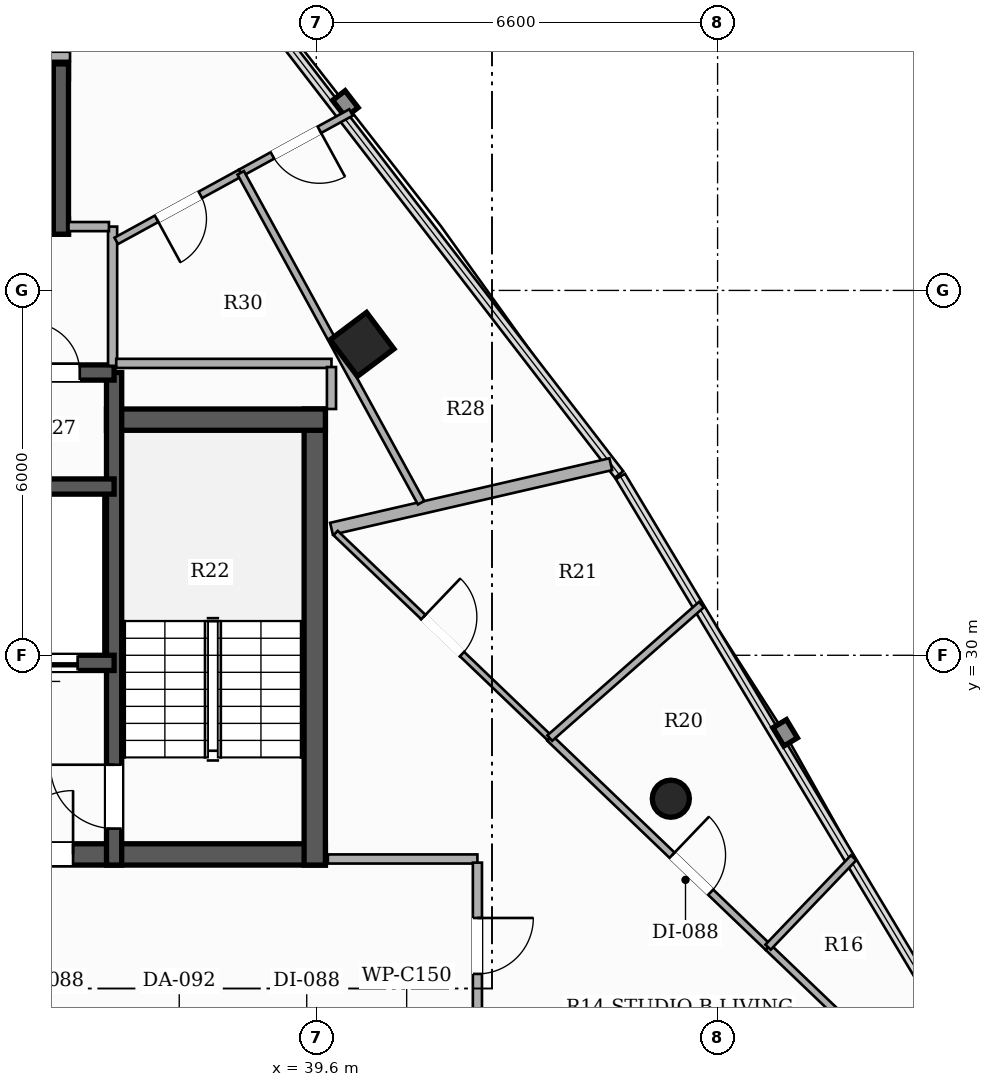
"""IFC4 building model, lengths in metres.
Left out: names, types, materials, properties, quantities, classifications, styles, units other than length and angle.
Written with IfcOpenShell. Run it as: python <this file> out.ifc"""

import sys

from ifc_helpers import new_model, si_unit, direction, frame, frame_2d, origin, origin_2d, place, context, subcontext, project, spatial, rectangle, hollow_rectangle, hollow_circle, extrude, element, fill, save


model = new_model("IFC4")
c1 = context("Model", 3, precision=1e-05, world=origin(), true_north=direction((0.0, 1.0)))
c2 = subcontext(c1, "Body", "Model", "MODEL_VIEW")
j1 = project(units=[si_unit("LENGTHUNIT", "METRE"), si_unit("PLANEANGLEUNIT", "RADIAN")], contexts=[c1])
p1 = place(None, origin())
s1 = spatial("IfcSite", under=j1, at=p1, CompositionType="ELEMENT")
p2 = place(p1, origin())
s2 = spatial("IfcBuilding", under=s1, at=p2, CompositionType="ELEMENT")
p3 = place(p2, frame((0.0, 0.0, 219.5)))
s3 = spatial("IfcBuildingStorey", under=s2, at=p3, CompositionType="ELEMENT", Elevation=219.5)
p4 = place(p3, frame((26.25, 26.725, 0.0), z_axis=(0.0, 0.0, 1.0), x_axis=(1.0, 0.0, 0.0)))
e1 = element("IfcWall", 1, at=p4, inside=s3, PredefinedType="SHEAR", context=c2, shape_type="SweptSolid", body=[
    extrude(rectangle(XDim=13.5, YDim=0.35, at=frame_2d((6.75, 0.0))), origin(), (0.0, 0.0, 1.0), 3.3),
])
p5 = place(p4, frame((4.35, 0.0, 0.0)))
e2 = element("IfcOpeningElement", 2, at=p5, cuts=e1, PredefinedType="OPENING", context=c2, shape_type="SweptSolid", body=[
    extrude(rectangle(XDim=1.05, YDim=2.15, at=frame_2d((0.525, 1.075))), frame((0.0, 0.185, 0.0), z_axis=(0.0, -1.0, 0.0), x_axis=(1.0, 0.0, 0.0)), (0.0, 0.0, 1.0), 0.37),
])
p6 = place(p4, frame((8.3, 0.0, 0.0)))
e3 = element("IfcOpeningElement", 3, at=p6, cuts=e1, PredefinedType="OPENING", context=c2, shape_type="SweptSolid", body=[
    extrude(rectangle(XDim=1.05, YDim=2.15, at=frame_2d((0.525, 1.075))), frame((0.0, 0.185, 0.0), z_axis=(0.0, -1.0, 0.0), x_axis=(1.0, 0.0, 0.0)), (0.0, 0.0, 1.0), 0.37),
])
p7 = place(p3, frame((39.575, 26.55, 0.0), z_axis=(0.0, 0.0, 1.0), x_axis=(0.0, 1.0, 0.0)))
e4 = element("IfcWall", 4, at=p7, inside=s3, PredefinedType="SHEAR", context=c2, shape_type="SweptSolid", body=[
    extrude(rectangle(XDim=7.5, YDim=0.35, at=frame_2d((3.75, 0.0))), origin(), (0.0, 0.0, 1.0), 3.3),
])
p8 = place(p3, frame((36.15, 33.875, 0.0), z_axis=(0.0, 0.0, 1.0), x_axis=(1.0, 0.0, 0.0)))
e5 = element("IfcWall", 5, at=p8, inside=s3, PredefinedType="SHEAR", context=c2, shape_type="SweptSolid", body=[
    extrude(rectangle(XDim=3.6, YDim=0.35, at=frame_2d((1.8, 0.0))), origin(), (0.0, 0.0, 1.0), 3.3),
])
p9 = place(p3, frame((36.275, 26.55, 0.0), z_axis=(0.0, 0.0, 1.0), x_axis=(0.0, 1.0, 0.0)))
e6 = element("IfcWall", 6, at=p9, inside=s3, PredefinedType="SHEAR", context=c2, shape_type="SweptSolid", body=[
    extrude(rectangle(XDim=8.1, YDim=0.25, at=frame_2d((4.05, 0.0))), origin(), (0.0, 0.0, 1.0), 3.3),
])
p10 = place(p9, frame((0.6, 0.0, 0.0)))
e7 = element("IfcOpeningElement", 7, at=p10, cuts=e6, PredefinedType="OPENING", context=c2, shape_type="SweptSolid", body=[
    extrude(rectangle(XDim=1.05, YDim=2.15, at=frame_2d((0.525, 1.075))), frame((0.0, 0.135, 0.0), z_axis=(0.0, -1.0, 0.0), x_axis=(1.0, 0.0, 0.0)), (0.0, 0.0, 1.0), 0.27),
])
p11 = place(p3, frame((36.275, 29.875, 0.0), z_axis=(0.0, 0.0, 1.0), x_axis=(-1.0, 0.0, 0.0)))
e8 = element("IfcWall", 8, at=p11, inside=s3, PredefinedType="SHEAR", context=c2, shape_type="SweptSolid", body=[
    extrude(rectangle(XDim=6.55, YDim=0.25, at=frame_2d((3.275, 0.0))), origin(), (0.0, 0.0, 1.0), 3.3),
])
p12 = place(p11, frame((4.875, 0.0, 0.0)))
e9 = element("IfcOpeningElement", 9, at=p12, cuts=e8, PredefinedType="OPENING", context=c2, shape_type="SweptSolid", body=[
    extrude(rectangle(XDim=1.1, YDim=2.2, at=frame_2d((0.55, 1.1))), frame((0.0, 0.135, 0.0), z_axis=(0.0, -1.0, 0.0), x_axis=(1.0, 0.0, 0.0)), (0.0, 0.0, 1.0), 0.27),
])
p13 = place(p11, frame((2.875, 0.0, 0.0)))
e10 = element("IfcOpeningElement", 10, at=p13, cuts=e8, PredefinedType="OPENING", context=c2, shape_type="SweptSolid", body=[
    extrude(rectangle(XDim=1.1, YDim=2.2, at=frame_2d((0.55, 1.1))), frame((0.0, 0.135, 0.0), z_axis=(0.0, -1.0, 0.0), x_axis=(1.0, 0.0, 0.0)), (0.0, 0.0, 1.0), 0.27),
])
p14 = place(p11, frame((0.6, 0.0, 0.0)))
e11 = element("IfcOpeningElement", 11, at=p14, cuts=e8, PredefinedType="OPENING", context=c2, shape_type="SweptSolid", body=[
    extrude(rectangle(XDim=1.3, YDim=2.2, at=frame_2d((0.65, 1.1))), frame((0.0, 0.135, 0.0), z_axis=(0.0, -1.0, 0.0), x_axis=(1.0, 0.0, 0.0)), (0.0, 0.0, 1.0), 0.27),
])
p15 = place(p3, frame((29.725, 32.775, 0.0), z_axis=(0.0, 0.0, 1.0), x_axis=(1.0, 0.0, 0.0)))
e12 = element("IfcWall", 12, at=p15, inside=s3, PredefinedType="SHEAR", context=c2, shape_type="SweptSolid", body=[
    extrude(rectangle(XDim=6.55, YDim=0.25, at=frame_2d((3.275, 0.0))), origin(), (0.0, 0.0, 1.0), 3.3),
])
p16 = place(p3, frame((29.725, 34.65, 0.0), z_axis=(0.0, 0.0, 1.0), x_axis=(1.0, 0.0, 0.0)))
e13 = element("IfcWall", 13, at=p16, inside=s3, PredefinedType="SHEAR", context=c2, shape_type="SweptSolid", body=[
    extrude(rectangle(XDim=6.55, YDim=0.25, at=frame_2d((3.275, 0.0))), origin(), (0.0, 0.0, 1.0), 3.3),
])
p17 = place(p16, frame((0.515, 0.0, 0.0)))
e14 = element("IfcOpeningElement", 14, at=p17, cuts=e13, PredefinedType="OPENING", context=c2, shape_type="SweptSolid", body=[
    extrude(rectangle(XDim=0.82, YDim=2.1, at=frame_2d((0.41, 1.05))), frame((0.0, 0.135, 0.0), z_axis=(0.0, -1.0, 0.0), x_axis=(1.0, 0.0, 0.0)), (0.0, 0.0, 1.0), 0.27),
])
p18 = place(p16, frame((2.065, 0.0, 0.0)))
e15 = element("IfcOpeningElement", 15, at=p18, cuts=e13, PredefinedType="OPENING", context=c2, shape_type="SweptSolid", body=[
    extrude(rectangle(XDim=0.82, YDim=2.1, at=frame_2d((0.41, 1.05))), frame((0.0, 0.135, 0.0), z_axis=(0.0, -1.0, 0.0), x_axis=(1.0, 0.0, 0.0)), (0.0, 0.0, 1.0), 0.27),
])
p19 = place(p16, frame((3.615, 0.0, 0.0)))
e16 = element("IfcOpeningElement", 16, at=p19, cuts=e13, PredefinedType="OPENING", context=c2, shape_type="SweptSolid", body=[
    extrude(rectangle(XDim=0.82, YDim=2.1, at=frame_2d((0.41, 1.05))), frame((0.0, 0.135, 0.0), z_axis=(0.0, -1.0, 0.0), x_axis=(1.0, 0.0, 0.0)), (0.0, 0.0, 1.0), 0.27),
])
p20 = place(p16, frame((5.165, 0.0, 0.0)))
e17 = element("IfcOpeningElement", 17, at=p20, cuts=e13, PredefinedType="OPENING", context=c2, shape_type="SweptSolid", body=[
    extrude(rectangle(XDim=0.82, YDim=2.1, at=frame_2d((0.41, 1.05))), frame((0.0, 0.135, 0.0), z_axis=(0.0, -1.0, 0.0), x_axis=(1.0, 0.0, 0.0)), (0.0, 0.0, 1.0), 0.27),
])
p21 = place(p3, frame((35.525, 37.05, 0.0), z_axis=(0.0, 0.0, 1.0), x_axis=(-1.0, 0.0, 0.0)))
e18 = element("IfcWall", 18, at=p21, inside=s3, PredefinedType="SHEAR", context=c2, shape_type="SweptSolid", body=[
    extrude(rectangle(XDim=5.05, YDim=0.25, at=frame_2d((2.525, 0.0))), origin(), (0.0, 0.0, 1.0), 3.3),
])
p22 = place(p21, frame((3.175, 0.0, 0.0)))
e19 = element("IfcOpeningElement", 19, at=p22, cuts=e18, PredefinedType="OPENING", context=c2, shape_type="SweptSolid", body=[
    extrude(rectangle(XDim=1.1, YDim=2.2, at=frame_2d((0.55, 1.1))), frame((0.0, 0.135, 0.0), z_axis=(0.0, -1.0, 0.0), x_axis=(1.0, 0.0, 0.0)), (0.0, 0.0, 1.0), 0.27),
])
p23 = place(p21, frame((0.775, 0.0, 0.0)))
e20 = element("IfcOpeningElement", 20, at=p23, cuts=e18, PredefinedType="OPENING", context=c2, shape_type="SweptSolid", body=[
    extrude(rectangle(XDim=1.1, YDim=2.2, at=frame_2d((0.55, 1.1))), frame((0.0, 0.135, 0.0), z_axis=(0.0, -1.0, 0.0), x_axis=(1.0, 0.0, 0.0)), (0.0, 0.0, 1.0), 0.27),
])
p24 = place(p3, frame((30.475, 39.6, 0.0), z_axis=(0.0, 0.0, 1.0), x_axis=(1.0, 0.0, 0.0)))
e21 = element("IfcWall", 21, at=p24, inside=s3, PredefinedType="SHEAR", context=c2, shape_type="SweptSolid", body=[
    extrude(rectangle(XDim=5.05, YDim=0.25, at=frame_2d((2.525, 0.0))), origin(), (0.0, 0.0, 1.0), 3.3),
])
p25 = place(p3, frame((35.4, 36.925, 0.0), z_axis=(0.0, 0.0, 1.0), x_axis=(0.0, 1.0, 0.0)))
e22 = element("IfcWall", 22, at=p25, inside=s3, PredefinedType="SHEAR", context=c2, shape_type="SweptSolid", body=[
    extrude(rectangle(XDim=2.8, YDim=0.25, at=frame_2d((1.4, 0.0))), origin(), (0.0, 0.0, 1.0), 3.3),
])
p26 = place(p3, frame((45.431, 27.641, 0.0), z_axis=(0.0, 0.0, 1.0), x_axis=(1.0, 0.0, 0.0)))
e23 = element("IfcColumn", 23, at=p26, inside=s3, PredefinedType="COLUMN", context=c2, shape_type="SweptSolid", body=[
    extrude(hollow_circle(Radius=0.305, WallThickness=0.016, at=origin_2d()), origin(), (0.0, 0.0, 1.0), 3.3),
])
p27 = place(p3, frame((40.352, 35.113, 0.0), z_axis=(0.0, 0.0, 1.0), x_axis=(-0.600420225326, 0.799684658487, 0.0)))
e24 = element("IfcColumn", 24, at=p27, inside=s3, PredefinedType="COLUMN", context=c2, shape_type="SweptSolid", body=[
    extrude(hollow_rectangle(XDim=0.75, YDim=0.75, WallThickness=0.025, at=origin_2d()), origin(), (0.0, 0.0, 1.0), 3.3),
])
p28 = place(p3, frame((36.25, 34.76, 0.0), z_axis=(0.0, 0.0, 1.0), x_axis=(0.0, 1.0, 0.0)))
e25 = element("IfcWall", 25, at=p28, inside=s3, PredefinedType="PARTITIONING", context=c2, shape_type="SweptSolid", body=[
    extrude(rectangle(XDim=2.29, YDim=0.15, at=frame_2d((1.145, 0.0))), origin(), (0.0, 0.0, 1.0), 2.425),
])
p29 = place(p3, frame((35.525, 37.05, 0.0), z_axis=(0.0, 0.0, 1.0), x_axis=(1.0, 0.0, 0.0)))
e26 = element("IfcWall", 26, at=p29, inside=s3, PredefinedType="PARTITIONING", context=c2, shape_type="SweptSolid", body=[
    extrude(rectangle(XDim=0.665, YDim=0.15, at=frame_2d((0.333, 0.0))), origin(), (0.0, 0.0, 1.0), 2.425),
])
p30 = place(p3, frame((39.79, 26.65, 0.0), z_axis=(0.0, 0.0, 1.0), x_axis=(1.0, 0.0, 0.0)))
e27 = element("IfcWall", 27, at=p30, inside=s3, PredefinedType="PARTITIONING", context=c2, shape_type="SweptSolid", body=[
    extrude(rectangle(XDim=2.46, YDim=0.15, at=frame_2d((1.23, 0.0))), origin(), (0.0, 0.0, 1.0), 2.565),
])
p31 = place(p3, frame((42.25, 26.59, 0.0), z_axis=(0.0, 0.0, 1.0), x_axis=(0.0, -1.0, 0.0)))
e28 = element("IfcWall", 28, at=p31, inside=s3, PredefinedType="PARTITIONING", context=c2, shape_type="SweptSolid", body=[
    extrude(rectangle(XDim=2.74, YDim=0.15, at=frame_2d((1.37, 0.0))), origin(), (0.0, 0.0, 1.0), 2.773),
])
p32 = place(p31, frame((0.91, 0.0, 0.0)))
e29 = element("IfcOpeningElement", 29, at=p32, cuts=e28, PredefinedType="OPENING", context=c2, shape_type="SweptSolid", body=[
    extrude(rectangle(XDim=0.92, YDim=2.15, at=frame_2d((0.46, 1.075))), frame((0.0, 0.085, 0.0), z_axis=(0.0, -1.0, 0.0), x_axis=(1.0, 0.0, 0.0)), (0.0, 0.0, 1.0), 0.17),
])
p33 = place(p3, frame((30.45, 39.85, 0.0), z_axis=(0.0, 0.0, 1.0), x_axis=(1.0, 0.0, 0.0)))
e30 = element("IfcWall", 30, at=p33, inside=s3, PredefinedType="PARTITIONING", context=c2, shape_type="SweptSolid", body=[
    extrude(rectangle(XDim=5.1, YDim=0.15, at=frame_2d((2.55, 0.0))), origin(), (0.0, 0.0, 1.0), 2.492),
])
p34 = place(p3, frame((36.31, 34.8, 0.0), z_axis=(0.0, 0.0, 1.0), x_axis=(1.0, 0.0, 0.0)))
e31 = element("IfcWall", 31, at=p34, inside=s3, PredefinedType="PARTITIONING", context=c2, shape_type="SweptSolid", body=[
    extrude(rectangle(XDim=3.54, YDim=0.15, at=frame_2d((1.77, 0.0))), origin(), (0.0, 0.0, 1.0), 2.425),
])
p35 = place(p3, frame((39.85, 34.74, 0.0), z_axis=(0.0, 0.0, 1.0), x_axis=(0.0, -1.0, 0.0)))
e32 = element("IfcWall", 32, at=p35, inside=s3, PredefinedType="PARTITIONING", context=c2, shape_type="SweptSolid", body=[
    extrude(rectangle(XDim=0.69, YDim=0.15, at=frame_2d((0.345, 0.0))), origin(), (0.0, 0.0, 1.0), 2.773),
])
p36 = place(p3, frame((39.85, 32.081, 0.0), z_axis=(0.0, 0.0, 1.0), x_axis=(0.974339670333, 0.225082666628, 0.0)))
e33 = element("IfcWall", 33, at=p36, inside=s3, PredefinedType="PARTITIONING", context=c2, shape_type="SweptSolid", body=[
    extrude(rectangle(XDim=4.714, YDim=0.2, at=frame_2d((2.357, 0.0))), origin(), (0.0, 0.0, 1.0), 2.492),
])
p37 = place(p3, frame((47.03, 25.2, 0.0), z_axis=(0.0, 0.0, 1.0), x_axis=(0.722345830301, -0.691531995968, 0.0)))
e34 = element("IfcWall", 34, at=p37, inside=s3, PredefinedType="PARTITIONING", context=c2, shape_type="SweptSolid", body=[
    extrude(rectangle(XDim=6.037, YDim=0.12, at=frame_2d((3.019, 0.0))), origin(), (0.0, 0.0, 1.0), 2.492),
])
p38 = place(p37, frame((2.609, 0.0, 0.0)))
e35 = element("IfcOpeningElement", 35, at=p38, cuts=e34, PredefinedType="OPENING", context=c2, shape_type="SweptSolid", body=[
    extrude(rectangle(XDim=0.82, YDim=2.1, at=frame_2d((0.41, 1.05))), frame((0.0, 0.07, 0.0), z_axis=(0.0, -1.0, 0.0), x_axis=(1.0, 0.0, 0.0)), (0.0, 0.0, 1.0), 0.14),
])
p39 = place(p3, frame((43.44, 28.638, 0.0), z_axis=(0.0, 0.0, 1.0), x_axis=(0.722240667523, -0.691641827954, 0.0)))
e36 = element("IfcWall", 36, at=p39, inside=s3, PredefinedType="PARTITIONING", context=c2, shape_type="SweptSolid", body=[
    extrude(rectangle(XDim=4.971, YDim=0.12, at=frame_2d((2.485, 0.0))), origin(), (0.0, 0.0, 1.0), 2.492),
])
p40 = place(p39, frame((2.785, 0.0, 0.0)))
e37 = element("IfcOpeningElement", 37, at=p40, cuts=e36, PredefinedType="OPENING", context=c2, shape_type="SweptSolid", body=[
    extrude(rectangle(XDim=0.88, YDim=2.1, at=frame_2d((0.44, 1.05))), frame((0.0, 0.07, 0.0), z_axis=(0.0, -1.0, 0.0), x_axis=(1.0, 0.0, 0.0)), (0.0, 0.0, 1.0), 0.14),
])
p41 = place(p3, frame((39.918, 32.01, 0.0), z_axis=(0.0, 0.0, 1.0), x_axis=(0.722311203135, -0.691568164266, 0.0)))
e38 = element("IfcWall", 38, at=p41, inside=s3, PredefinedType="PARTITIONING", context=c2, shape_type="SweptSolid", body=[
    extrude(rectangle(XDim=4.876, YDim=0.1, at=frame_2d((2.438, 0.0))), origin(), (0.0, 0.0, 1.0), 2.773),
])
p42 = place(p41, frame((1.998, 0.0, 0.0)))
e39 = element("IfcOpeningElement", 39, at=p42, cuts=e38, PredefinedType="OPENING", context=c2, shape_type="SweptSolid", body=[
    extrude(rectangle(XDim=0.88, YDim=2.1, at=frame_2d((0.44, 1.05))), frame((0.0, 0.06, 0.0), z_axis=(0.0, -1.0, 0.0), x_axis=(1.0, 0.0, 0.0)), (0.0, 0.0, 1.0), 0.12),
])
p43 = place(p3, frame((47.03, 25.2, 0.0), z_axis=(0.0, 0.0, 1.0), x_axis=(0.691459612883, 0.722415118717, 0.0)))
e40 = element("IfcWall", 40, at=p43, inside=s3, PredefinedType="PARTITIONING", context=c2, shape_type="SweptSolid", body=[
    extrude(rectangle(XDim=2.035, YDim=0.12, at=frame_2d((1.018, 0.0))), origin(), (0.0, 0.0, 1.0), 2.492),
])
p44 = place(p3, frame((43.44, 28.638, 0.0), z_axis=(0.0, 0.0, 1.0), x_axis=(0.750679989093, 0.66066599275, 0.0)))
e41 = element("IfcWall", 41, at=p44, inside=s3, PredefinedType="PARTITIONING", context=c2, shape_type="SweptSolid", body=[
    extrude(rectangle(XDim=3.323, YDim=0.12, at=frame_2d((1.661, 0.0))), origin(), (0.0, 0.0, 1.0), 2.492),
])
p45 = place(p3, frame((38.357, 37.934, 0.0), z_axis=(0.0, 0.0, 1.0), x_axis=(-0.877415192217, -0.479731779714, 0.0)))
e42 = element("IfcWall", 42, at=p45, inside=s3, PredefinedType="PARTITIONING", context=c2, shape_type="SweptSolid", body=[
    extrude(rectangle(XDim=2.333, YDim=0.12, at=frame_2d((1.167, 0.0))), origin(), (0.0, 0.0, 1.0), 2.425),
])
p46 = place(p45, frame((0.756, 0.0, 0.0)))
e43 = element("IfcOpeningElement", 43, at=p46, cuts=e42, PredefinedType="OPENING", context=c2, shape_type="SweptSolid", body=[
    extrude(rectangle(XDim=0.82, YDim=2.1, at=frame_2d((0.41, 1.05))), frame((0.0, 0.07, 0.0), z_axis=(0.0, -1.0, 0.0), x_axis=(1.0, 0.0, 0.0)), (0.0, 0.0, 1.0), 0.14),
])
p47 = place(p3, frame((40.172, 38.927, 0.0), z_axis=(0.0, 0.0, 1.0), x_axis=(-0.877322236726, -0.479901753432, 0.0)))
e44 = element("IfcWall", 44, at=p47, inside=s3, PredefinedType="PARTITIONING", context=c2, shape_type="SweptSolid", body=[
    extrude(rectangle(XDim=2.069, YDim=0.12, at=frame_2d((1.035, 0.0))), origin(), (0.0, 0.0, 1.0), 3.06),
])
p48 = place(p47, frame((0.594, 0.0, 0.0)))
e45 = element("IfcOpeningElement", 45, at=p48, cuts=e44, PredefinedType="OPENING", context=c2, shape_type="SweptSolid", body=[
    extrude(rectangle(XDim=0.88, YDim=2.1, at=frame_2d((0.44, 1.05))), frame((0.0, 0.07, 0.0), z_axis=(0.0, -1.0, 0.0), x_axis=(1.0, 0.0, 0.0)), (0.0, 0.0, 1.0), 0.14),
])
p49 = place(p3, frame((38.357, 37.934, 0.0), z_axis=(0.0, 0.0, 1.0), x_axis=(0.479839410825, -0.877356335715, 0.0)))
e46 = element("IfcWall", 46, at=p49, inside=s3, PredefinedType="PARTITIONING", context=c2, shape_type="SweptSolid", body=[
    extrude(rectangle(XDim=6.183, YDim=0.12, at=frame_2d((3.092, 0.0))), origin(), (0.0, 0.0, 1.0), 2.492),
])
p50 = place(p10, origin())
e47 = element("IfcDoor", 47, at=p50, inside=s3, OperationType="SINGLE_SWING_RIGHT", PredefinedType="DOOR", context=c2, shape_type="SweptSolid", body=[
    extrude(rectangle(XDim=1.05, YDim=2.15, at=frame_2d((0.525, 1.075))), frame((0.0, 0.025, 0.0), z_axis=(0.0, -1.0, 0.0), x_axis=(1.0, 0.0, 0.0)), (0.0, 0.0, 1.0), 0.05),
])
fill(e7, e47)
p51 = place(p6, origin())
e48 = element("IfcDoor", 48, at=p51, inside=s3, OperationType="SINGLE_SWING_RIGHT", PredefinedType="DOOR", context=c2, shape_type="SweptSolid", body=[
    extrude(rectangle(XDim=1.05, YDim=2.15, at=frame_2d((0.525, 1.075))), frame((0.0, 0.025, 0.0), z_axis=(0.0, -1.0, 0.0), x_axis=(1.0, 0.0, 0.0)), (0.0, 0.0, 1.0), 0.05),
])
fill(e3, e48)
p52 = place(p14, origin())
e49 = element("IfcDoor", 49, at=p52, inside=s3, OperationType="DOUBLE_DOOR_SLIDING", PredefinedType="DOOR", context=c2, shape_type="SweptSolid", body=[
    extrude(rectangle(XDim=1.3, YDim=2.2, at=frame_2d((0.65, 1.1))), frame((0.0, 0.025, 0.0), z_axis=(0.0, -1.0, 0.0), x_axis=(1.0, 0.0, 0.0)), (0.0, 0.0, 1.0), 0.05),
])
fill(e11, e49)
p53 = place(p20, origin())
e50 = element("IfcDoor", 50, at=p53, inside=s3, OperationType="SINGLE_SWING_LEFT", PredefinedType="DOOR", context=c2, shape_type="SweptSolid", body=[
    extrude(rectangle(XDim=0.82, YDim=2.1, at=frame_2d((0.41, 1.05))), frame((0.0, 0.025, 0.0), z_axis=(0.0, -1.0, 0.0), x_axis=(1.0, 0.0, 0.0)), (0.0, 0.0, 1.0), 0.05),
])
fill(e17, e50)
p54 = place(p32, origin())
e51 = element("IfcDoor", 51, at=p54, inside=s3, OperationType="SINGLE_SWING_LEFT", PredefinedType="DOOR", context=c2, shape_type="SweptSolid", body=[
    extrude(rectangle(XDim=0.92, YDim=2.15, at=frame_2d((0.46, 1.075))), frame((0.0, 0.025, 0.0), z_axis=(0.0, -1.0, 0.0), x_axis=(1.0, 0.0, 0.0)), (0.0, 0.0, 1.0), 0.05),
])
fill(e29, e51)
p55 = place(p40, origin())
e52 = element("IfcDoor", 52, at=p55, inside=s3, OperationType="SINGLE_SWING_LEFT", PredefinedType="DOOR", context=c2, shape_type="SweptSolid", body=[
    extrude(rectangle(XDim=0.88, YDim=2.1, at=frame_2d((0.44, 1.05))), frame((0.0, 0.025, 0.0), z_axis=(0.0, -1.0, 0.0), x_axis=(1.0, 0.0, 0.0)), (0.0, 0.0, 1.0), 0.05),
])
fill(e37, e52)
p56 = place(p42, origin())
e53 = element("IfcDoor", 53, at=p56, inside=s3, OperationType="SINGLE_SWING_LEFT", PredefinedType="DOOR", context=c2, shape_type="SweptSolid", body=[
    extrude(rectangle(XDim=0.88, YDim=2.1, at=frame_2d((0.44, 1.05))), frame((0.0, 0.025, 0.0), z_axis=(0.0, -1.0, 0.0), x_axis=(1.0, 0.0, 0.0)), (0.0, 0.0, 1.0), 0.05),
])
fill(e39, e53)
p57 = place(p46, origin())
e54 = element("IfcDoor", 54, at=p57, inside=s3, OperationType="SINGLE_SWING_RIGHT", PredefinedType="DOOR", context=c2, shape_type="SweptSolid", body=[
    extrude(rectangle(XDim=0.82, YDim=2.1, at=frame_2d((0.41, 1.05))), frame((0.0, 0.025, 0.0), z_axis=(0.0, -1.0, 0.0), x_axis=(1.0, 0.0, 0.0)), (0.0, 0.0, 1.0), 0.05),
])
fill(e43, e54)
p58 = place(p48, origin())
e55 = element("IfcDoor", 55, at=p58, inside=s3, OperationType="SINGLE_SWING_LEFT", PredefinedType="DOOR", context=c2, shape_type="SweptSolid", body=[
    extrude(rectangle(XDim=0.88, YDim=2.1, at=frame_2d((0.44, 1.05))), frame((0.0, 0.025, 0.0), z_axis=(0.0, -1.0, 0.0), x_axis=(1.0, 0.0, 0.0)), (0.0, 0.0, 1.0), 0.05),
])
fill(e45, e55)
save(model, sys.argv[1])
